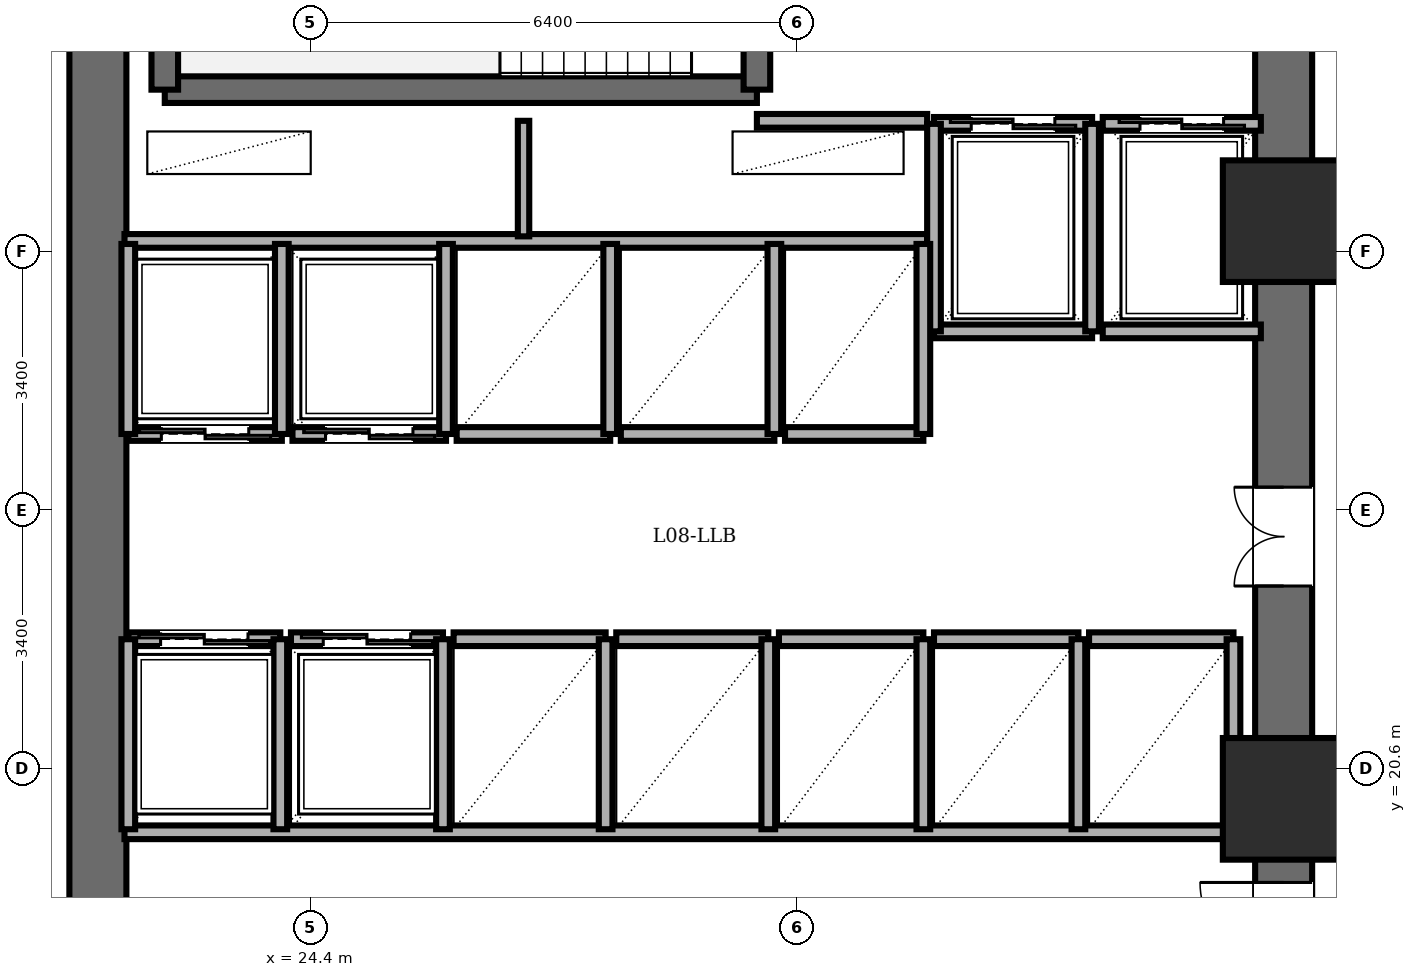
"""IFC4 building model, lengths in metres.
Left out: names, types, materials, properties, quantities, classifications, styles, units other than length and angle.
Written with IfcOpenShell. Run it as: python <this file> out.ifc"""

import sys

from ifc_helpers import new_model, si_unit, direction, frame, frame_2d, origin, origin_2d, place, context, subcontext, project, spatial, rectangle, extrude, element, fill, save


model = new_model("IFC4")
c1 = context("Model", 3, precision=1e-05, world=origin(), true_north=direction((0.0, 1.0)))
c2 = subcontext(c1, "Body", "Model", "MODEL_VIEW")
j1 = project(units=[si_unit("LENGTHUNIT", "METRE"), si_unit("PLANEANGLEUNIT", "RADIAN")], contexts=[c1])
p1 = place(None, origin())
s1 = spatial("IfcSite", under=j1, at=p1, CompositionType="ELEMENT")
p2 = place(p1, origin())
s2 = spatial("IfcBuilding", under=s1, at=p2, CompositionType="ELEMENT")
p3 = place(p2, frame((0.0, 0.0, 32.4)))
s3 = spatial("IfcBuildingStorey", under=s2, at=p3, CompositionType="ELEMENT", Elevation=32.4)
for number, where, z_axis, x_axis in (
    (1, (37.2, 20.2, 0.0), (0.0, 0.0, 1.0), (1.0, 0.0, 0.0)),
    (2, (37.2, 27.8, 0.0), (0.0, 0.0, 1.0), (1.0, 0.0, 0.0)),
):
    element("IfcColumn", number, at=place(p3, frame(where, z_axis=z_axis, x_axis=x_axis)), inside=s3, PredefinedType="COLUMN", context=c2, shape_type="SweptSolid", body=[
        extrude(rectangle(XDim=1.6, YDim=1.6, at=origin_2d()), origin(), (0.0, 0.0, 1.0), 3.6),
    ])
p4 = place(p3, frame((21.6, 14.4, 0.0), z_axis=(0.0, 0.0, 1.0), x_axis=(0.0, 1.0, 0.0)))
e3 = element("IfcWall", 3, at=p4, inside=s3, PredefinedType="SHEAR", context=c2, shape_type="SweptSolid", body=[
    extrude(rectangle(XDim=19.2, YDim=0.75, at=frame_2d((9.6, 0.0))), origin(), (0.0, 0.0, 1.0), 3.4),
])
p5 = place(p3, frame((37.2, 14.4, 0.0), z_axis=(0.0, 0.0, 1.0), x_axis=(0.0, 1.0, 0.0)))
e4 = element("IfcWall", 4, at=p5, inside=s3, PredefinedType="SHEAR", context=c2, shape_type="SweptSolid", body=[
    extrude(rectangle(XDim=19.2, YDim=0.75, at=frame_2d((9.6, 0.0))), origin(), (0.0, 0.0, 1.0), 3.4),
])
p6 = place(p5, frame((15.8, 0.0, 0.0)))
e5 = element("IfcOpeningElement", 5, at=p6, cuts=e4, PredefinedType="OPENING", context=c2, shape_type="SweptSolid", body=[
    extrude(rectangle(XDim=1.15, YDim=2.15, at=frame_2d((0.575, 1.075))), frame((0.0, 0.385, 0.0), z_axis=(0.0, -1.0, 0.0), x_axis=(1.0, 0.0, 0.0)), (0.0, 0.0, 1.0), 0.77),
])
p7 = place(p5, frame((3.6, 0.0, 0.0)))
e6 = element("IfcOpeningElement", 6, at=p7, cuts=e4, PredefinedType="OPENING", context=c2, shape_type="SweptSolid", body=[
    extrude(rectangle(XDim=1.1, YDim=2.15, at=frame_2d((0.55, 1.075))), frame((0.0, 0.385, 0.0), z_axis=(0.0, -1.0, 0.0), x_axis=(1.0, 0.0, 0.0)), (0.0, 0.0, 1.0), 0.77),
])
p8 = place(p5, frame((8.6, 0.0, 0.0)))
e7 = element("IfcOpeningElement", 7, at=p8, cuts=e4, PredefinedType="OPENING", context=c2, shape_type="SweptSolid", body=[
    extrude(rectangle(XDim=1.3, YDim=2.2, at=frame_2d((0.65, 1.1))), frame((0.0, 0.385, 0.0), z_axis=(0.0, -1.0, 0.0), x_axis=(1.0, 0.0, 0.0)), (0.0, 0.0, 1.0), 0.77),
])
p9 = place(p3, frame((22.48, 29.53, 0.0), z_axis=(0.0, 0.0, 1.0), x_axis=(1.0, 0.0, 0.0)))
e8 = element("IfcWall", 8, at=p9, inside=s3, PredefinedType="SOLIDWALL", context=c2, shape_type="SweptSolid", body=[
    extrude(rectangle(XDim=7.79, YDim=0.35, at=frame_2d((3.895, 0.0))), origin(), (0.0, 0.0, 1.0), 3.4),
])
p10 = place(p3, frame((22.48, 29.53, 0.0), z_axis=(0.0, 0.0, 1.0), x_axis=(0.0, 1.0, 0.0)))
e9 = element("IfcWall", 9, at=p10, inside=s3, PredefinedType="SOLIDWALL", context=c2, shape_type="SweptSolid", body=[
    extrude(rectangle(XDim=3.58, YDim=0.35, at=frame_2d((1.79, 0.0))), origin(), (0.0, 0.0, 1.0), 3.4),
])
p11 = place(p3, frame((30.27, 29.53, 0.0), z_axis=(0.0, 0.0, 1.0), x_axis=(0.0, 1.0, 0.0)))
e10 = element("IfcWall", 10, at=p11, inside=s3, PredefinedType="SOLIDWALL", context=c2, shape_type="SweptSolid", body=[
    extrude(rectangle(XDim=3.58, YDim=0.35, at=frame_2d((1.79, 0.0))), origin(), (0.0, 0.0, 1.0), 3.4),
])
p12 = place(p11, frame((1.25, 0.0, 0.0)))
e11 = element("IfcOpeningElement", 11, at=p12, cuts=e10, PredefinedType="OPENING", context=c2, shape_type="SweptSolid", body=[
    extrude(rectangle(XDim=1.1, YDim=2.15, at=frame_2d((0.55, 1.075))), frame((0.0, 0.185, 0.0), z_axis=(0.0, -1.0, 0.0), x_axis=(1.0, 0.0, 0.0)), (0.0, 0.0, 1.0), 0.37),
])
p13 = place(p3, frame((30.27, 29.12, 0.0), z_axis=(0.0, 0.0, 1.0), x_axis=(1.0, 0.0, 0.0)))
e12 = element("IfcWall", 12, at=p13, inside=s3, PredefinedType="PARTITIONING", context=c2, shape_type="SweptSolid", body=[
    extrude(rectangle(XDim=2.24, YDim=0.18, at=frame_2d((1.12, 0.0))), origin(), (0.0, 0.0, 1.0), 3.4),
])
p14 = place(p3, frame((21.95, 27.54, 0.0), z_axis=(0.0, 0.0, 1.0), x_axis=(1.0, 0.0, 0.0)))
e13 = element("IfcWall", 13, at=p14, inside=s3, PredefinedType="PARTITIONING", context=c2, shape_type="SweptSolid", body=[
    extrude(rectangle(XDim=10.56, YDim=0.18, at=frame_2d((5.28, 0.0))), origin(), (0.0, 0.0, 1.0), 3.4),
])
p15 = place(p3, frame((27.2, 27.6, 0.0), z_axis=(0.0, 0.0, 1.0), x_axis=(0.0, 1.0, 0.0)))
e14 = element("IfcWall", 14, at=p15, inside=s3, PredefinedType="PARTITIONING", context=c2, shape_type="SweptSolid", body=[
    extrude(rectangle(XDim=1.52, YDim=0.15, at=frame_2d((0.76, 0.0))), origin(), (0.0, 0.0, 1.0), 3.4),
])
p16 = place(p3, frame((21.95, 19.76, 0.0), z_axis=(0.0, 0.0, 1.0), x_axis=(1.0, 0.0, 0.0)))
e15 = element("IfcWall", 15, at=p16, inside=s3, PredefinedType="PARTITIONING", context=c2, shape_type="SweptSolid", body=[
    extrude(rectangle(XDim=14.87, YDim=0.18, at=frame_2d((7.435, 0.0))), origin(), (0.0, 0.0, 1.0), 3.4),
])
p17 = place(p3, frame((32.6, 29.08, 0.0), z_axis=(0.0, 0.0, 1.0), x_axis=(1.0, 0.0, 0.0)))
e16 = element("IfcWall", 16, at=p17, inside=s3, PredefinedType="PARTITIONING", context=c2, shape_type="SweptSolid", body=[
    extrude(rectangle(XDim=2.08, YDim=0.18, at=frame_2d((1.04, 0.0))), origin(), (0.0, 0.0, 1.0), 3.4),
])
p18 = place(p17, frame((0.49, 0.0, 0.0)))
e17 = element("IfcOpeningElement", 17, at=p18, cuts=e16, PredefinedType="OPENING", context=c2, shape_type="SweptSolid", body=[
    extrude(rectangle(XDim=1.1, YDim=2.2, at=frame_2d((0.55, 1.1))), frame((0.0, 0.1, 0.0), z_axis=(0.0, -1.0, 0.0), x_axis=(1.0, 0.0, 0.0)), (0.0, 0.0, 1.0), 0.2),
])
p19 = place(p3, frame((34.68, 26.35, 0.0), z_axis=(0.0, 0.0, 1.0), x_axis=(-1.0, 0.0, 0.0)))
e18 = element("IfcWall", 18, at=p19, inside=s3, PredefinedType="PARTITIONING", context=c2, shape_type="SweptSolid", body=[
    extrude(rectangle(XDim=2.08, YDim=0.18, at=frame_2d((1.04, 0.0))), origin(), (0.0, 0.0, 1.0), 3.4),
])
for number, where, z_axis, x_axis in (
    (19, (34.68, 26.35, 0.0), (0.0, 0.0, 1.0), (0.0, 1.0, 0.0)),
    (20, (32.6, 29.08, 0.0), (0.0, 0.0, 1.0), (0.0, -1.0, 0.0)),
):
    element("IfcWall", number, at=place(p3, frame(where, z_axis=z_axis, x_axis=x_axis)), inside=s3, PredefinedType="PARTITIONING", context=c2, shape_type="SweptSolid", body=[
        extrude(rectangle(XDim=2.73, YDim=0.18, at=frame_2d((1.365, 0.0))), origin(), (0.0, 0.0, 1.0), 3.4),
    ])
p20 = place(p3, frame((34.82, 29.08, 0.0), z_axis=(0.0, 0.0, 1.0), x_axis=(1.0, 0.0, 0.0)))
e21 = element("IfcWall", 21, at=p20, inside=s3, PredefinedType="PARTITIONING", context=c2, shape_type="SweptSolid", body=[
    extrude(rectangle(XDim=2.08, YDim=0.18, at=frame_2d((1.04, 0.0))), origin(), (0.0, 0.0, 1.0), 3.4),
])
p21 = place(p20, frame((0.49, 0.0, 0.0)))
e22 = element("IfcOpeningElement", 22, at=p21, cuts=e21, PredefinedType="OPENING", context=c2, shape_type="SweptSolid", body=[
    extrude(rectangle(XDim=1.1, YDim=2.2, at=frame_2d((0.55, 1.1))), frame((0.0, 0.1, 0.0), z_axis=(0.0, -1.0, 0.0), x_axis=(1.0, 0.0, 0.0)), (0.0, 0.0, 1.0), 0.2),
])
p22 = place(p3, frame((36.9, 26.35, 0.0), z_axis=(0.0, 0.0, 1.0), x_axis=(-1.0, 0.0, 0.0)))
e23 = element("IfcWall", 23, at=p22, inside=s3, PredefinedType="PARTITIONING", context=c2, shape_type="SweptSolid", body=[
    extrude(rectangle(XDim=2.08, YDim=0.18, at=frame_2d((1.04, 0.0))), origin(), (0.0, 0.0, 1.0), 3.4),
])
p23 = place(p3, frame((24.02, 25.0, 0.0), z_axis=(0.0, 0.0, 1.0), x_axis=(-1.0, 0.0, 0.0)))
e24 = element("IfcWall", 24, at=p23, inside=s3, PredefinedType="PARTITIONING", context=c2, shape_type="SweptSolid", body=[
    extrude(rectangle(XDim=2.02, YDim=0.18, at=frame_2d((1.01, 0.0))), origin(), (0.0, 0.0, 1.0), 3.4),
])
p24 = place(p23, frame((0.435, 0.0, 0.0)))
e25 = element("IfcOpeningElement", 25, at=p24, cuts=e24, PredefinedType="OPENING", context=c2, shape_type="SweptSolid", body=[
    extrude(rectangle(XDim=1.15, YDim=2.2, at=frame_2d((0.575, 1.1))), frame((0.0, 0.1, 0.0), z_axis=(0.0, -1.0, 0.0), x_axis=(1.0, 0.0, 0.0)), (0.0, 0.0, 1.0), 0.2),
])
for number, where, z_axis, x_axis in (
    (26, (24.02, 25.0, 0.0), (0.0, 0.0, 1.0), (0.0, 1.0, 0.0)),
    (27, (22.0, 27.5, 0.0), (0.0, 0.0, 1.0), (0.0, -1.0, 0.0)),
):
    element("IfcWall", number, at=place(p3, frame(where, z_axis=z_axis, x_axis=x_axis)), inside=s3, PredefinedType="PARTITIONING", context=c2, shape_type="SweptSolid", body=[
        extrude(rectangle(XDim=2.5, YDim=0.18, at=frame_2d((1.25, 0.0))), origin(), (0.0, 0.0, 1.0), 3.4),
    ])
p25 = place(p3, frame((26.18, 25.0, 0.0), z_axis=(0.0, 0.0, 1.0), x_axis=(-1.0, 0.0, 0.0)))
e28 = element("IfcWall", 28, at=p25, inside=s3, PredefinedType="PARTITIONING", context=c2, shape_type="SweptSolid", body=[
    extrude(rectangle(XDim=2.02, YDim=0.18, at=frame_2d((1.01, 0.0))), origin(), (0.0, 0.0, 1.0), 3.4),
])
p26 = place(p25, frame((0.435, 0.0, 0.0)))
e29 = element("IfcOpeningElement", 29, at=p26, cuts=e28, PredefinedType="OPENING", context=c2, shape_type="SweptSolid", body=[
    extrude(rectangle(XDim=1.15, YDim=2.2, at=frame_2d((0.575, 1.1))), frame((0.0, 0.1, 0.0), z_axis=(0.0, -1.0, 0.0), x_axis=(1.0, 0.0, 0.0)), (0.0, 0.0, 1.0), 0.2),
])
p27 = place(p3, frame((26.18, 25.0, 0.0), z_axis=(0.0, 0.0, 1.0), x_axis=(0.0, 1.0, 0.0)))
e30 = element("IfcWall", 30, at=p27, inside=s3, PredefinedType="PARTITIONING", context=c2, shape_type="SweptSolid", body=[
    extrude(rectangle(XDim=2.5, YDim=0.18, at=frame_2d((1.25, 0.0))), origin(), (0.0, 0.0, 1.0), 3.4),
])
p28 = place(p3, frame((22.0, 22.3, 0.0), z_axis=(0.0, 0.0, 1.0), x_axis=(1.0, 0.0, 0.0)))
e31 = element("IfcWall", 31, at=p28, inside=s3, PredefinedType="PARTITIONING", context=c2, shape_type="SweptSolid", body=[
    extrude(rectangle(XDim=2.0, YDim=0.18, at=frame_2d((1.0, 0.0))), origin(), (0.0, 0.0, 1.0), 3.4),
])
p29 = place(p28, frame((0.425, 0.0, 0.0)))
e32 = element("IfcOpeningElement", 32, at=p29, cuts=e31, PredefinedType="OPENING", context=c2, shape_type="SweptSolid", body=[
    extrude(rectangle(XDim=1.15, YDim=2.2, at=frame_2d((0.575, 1.1))), frame((0.0, 0.1, 0.0), z_axis=(0.0, -1.0, 0.0), x_axis=(1.0, 0.0, 0.0)), (0.0, 0.0, 1.0), 0.2),
])
for number, where, z_axis, x_axis in (
    (33, (24.0, 19.8, 0.0), (0.0, 0.0, 1.0), (0.0, 1.0, 0.0)),
    (34, (22.0, 22.3, 0.0), (0.0, 0.0, 1.0), (0.0, -1.0, 0.0)),
):
    element("IfcWall", number, at=place(p3, frame(where, z_axis=z_axis, x_axis=x_axis)), inside=s3, PredefinedType="PARTITIONING", context=c2, shape_type="SweptSolid", body=[
        extrude(rectangle(XDim=2.5, YDim=0.18, at=frame_2d((1.25, 0.0))), origin(), (0.0, 0.0, 1.0), 3.4),
    ])
p30 = place(p3, frame((24.14, 22.3, 0.0), z_axis=(0.0, 0.0, 1.0), x_axis=(1.0, 0.0, 0.0)))
e35 = element("IfcWall", 35, at=p30, inside=s3, PredefinedType="PARTITIONING", context=c2, shape_type="SweptSolid", body=[
    extrude(rectangle(XDim=2.0, YDim=0.18, at=frame_2d((1.0, 0.0))), origin(), (0.0, 0.0, 1.0), 3.4),
])
p31 = place(p30, frame((0.425, 0.0, 0.0)))
e36 = element("IfcOpeningElement", 36, at=p31, cuts=e35, PredefinedType="OPENING", context=c2, shape_type="SweptSolid", body=[
    extrude(rectangle(XDim=1.15, YDim=2.2, at=frame_2d((0.575, 1.1))), frame((0.0, 0.1, 0.0), z_axis=(0.0, -1.0, 0.0), x_axis=(1.0, 0.0, 0.0)), (0.0, 0.0, 1.0), 0.2),
])
p32 = place(p3, frame((26.14, 19.8, 0.0), z_axis=(0.0, 0.0, 1.0), x_axis=(0.0, 1.0, 0.0)))
e37 = element("IfcWall", 37, at=p32, inside=s3, PredefinedType="PARTITIONING", context=c2, shape_type="SweptSolid", body=[
    extrude(rectangle(XDim=2.5, YDim=0.18, at=frame_2d((1.25, 0.0))), origin(), (0.0, 0.0, 1.0), 3.4),
])
p33 = place(p3, frame((28.34, 25.0, 0.0), z_axis=(0.0, 0.0, 1.0), x_axis=(-1.0, 0.0, 0.0)))
e38 = element("IfcWall", 38, at=p33, inside=s3, PredefinedType="PARTITIONING", context=c2, shape_type="SweptSolid", body=[
    extrude(rectangle(XDim=2.02, YDim=0.18, at=frame_2d((1.01, 0.0))), origin(), (0.0, 0.0, 1.0), 3.4),
])
p34 = place(p3, frame((28.34, 25.0, 0.0), z_axis=(0.0, 0.0, 1.0), x_axis=(0.0, 1.0, 0.0)))
e39 = element("IfcWall", 39, at=p34, inside=s3, PredefinedType="PARTITIONING", context=c2, shape_type="SweptSolid", body=[
    extrude(rectangle(XDim=2.5, YDim=0.18, at=frame_2d((1.25, 0.0))), origin(), (0.0, 0.0, 1.0), 3.4),
])
p35 = place(p3, frame((30.5, 25.0, 0.0), z_axis=(0.0, 0.0, 1.0), x_axis=(-1.0, 0.0, 0.0)))
e40 = element("IfcWall", 40, at=p35, inside=s3, PredefinedType="PARTITIONING", context=c2, shape_type="SweptSolid", body=[
    extrude(rectangle(XDim=2.02, YDim=0.18, at=frame_2d((1.01, 0.0))), origin(), (0.0, 0.0, 1.0), 3.4),
])
p36 = place(p3, frame((30.5, 25.0, 0.0), z_axis=(0.0, 0.0, 1.0), x_axis=(0.0, 1.0, 0.0)))
e41 = element("IfcWall", 41, at=p36, inside=s3, PredefinedType="PARTITIONING", context=c2, shape_type="SweptSolid", body=[
    extrude(rectangle(XDim=2.5, YDim=0.18, at=frame_2d((1.25, 0.0))), origin(), (0.0, 0.0, 1.0), 3.4),
])
p37 = place(p3, frame((26.28, 22.3, 0.0), z_axis=(0.0, 0.0, 1.0), x_axis=(1.0, 0.0, 0.0)))
e42 = element("IfcWall", 42, at=p37, inside=s3, PredefinedType="PARTITIONING", context=c2, shape_type="SweptSolid", body=[
    extrude(rectangle(XDim=2.0, YDim=0.18, at=frame_2d((1.0, 0.0))), origin(), (0.0, 0.0, 1.0), 3.4),
])
p38 = place(p3, frame((28.28, 19.8, 0.0), z_axis=(0.0, 0.0, 1.0), x_axis=(0.0, 1.0, 0.0)))
e43 = element("IfcWall", 43, at=p38, inside=s3, PredefinedType="PARTITIONING", context=c2, shape_type="SweptSolid", body=[
    extrude(rectangle(XDim=2.5, YDim=0.18, at=frame_2d((1.25, 0.0))), origin(), (0.0, 0.0, 1.0), 3.4),
])
p39 = place(p3, frame((28.42, 22.3, 0.0), z_axis=(0.0, 0.0, 1.0), x_axis=(1.0, 0.0, 0.0)))
e44 = element("IfcWall", 44, at=p39, inside=s3, PredefinedType="PARTITIONING", context=c2, shape_type="SweptSolid", body=[
    extrude(rectangle(XDim=2.0, YDim=0.18, at=frame_2d((1.0, 0.0))), origin(), (0.0, 0.0, 1.0), 3.4),
])
p40 = place(p3, frame((30.42, 19.8, 0.0), z_axis=(0.0, 0.0, 1.0), x_axis=(0.0, 1.0, 0.0)))
e45 = element("IfcWall", 45, at=p40, inside=s3, PredefinedType="PARTITIONING", context=c2, shape_type="SweptSolid", body=[
    extrude(rectangle(XDim=2.5, YDim=0.18, at=frame_2d((1.25, 0.0))), origin(), (0.0, 0.0, 1.0), 3.4),
])
p41 = place(p3, frame((32.46, 25.0, 0.0), z_axis=(0.0, 0.0, 1.0), x_axis=(-1.0, 0.0, 0.0)))
e46 = element("IfcWall", 46, at=p41, inside=s3, PredefinedType="PARTITIONING", context=c2, shape_type="SweptSolid", body=[
    extrude(rectangle(XDim=1.82, YDim=0.18, at=frame_2d((0.91, 0.0))), origin(), (0.0, 0.0, 1.0), 3.4),
])
p42 = place(p3, frame((32.46, 25.0, 0.0), z_axis=(0.0, 0.0, 1.0), x_axis=(0.0, 1.0, 0.0)))
e47 = element("IfcWall", 47, at=p42, inside=s3, PredefinedType="PARTITIONING", context=c2, shape_type="SweptSolid", body=[
    extrude(rectangle(XDim=2.5, YDim=0.18, at=frame_2d((1.25, 0.0))), origin(), (0.0, 0.0, 1.0), 3.4),
])
p43 = place(p3, frame((30.56, 22.3, 0.0), z_axis=(0.0, 0.0, 1.0), x_axis=(1.0, 0.0, 0.0)))
e48 = element("IfcWall", 48, at=p43, inside=s3, PredefinedType="PARTITIONING", context=c2, shape_type="SweptSolid", body=[
    extrude(rectangle(XDim=1.9, YDim=0.18, at=frame_2d((0.95, 0.0))), origin(), (0.0, 0.0, 1.0), 3.4),
])
p44 = place(p3, frame((32.46, 19.8, 0.0), z_axis=(0.0, 0.0, 1.0), x_axis=(0.0, 1.0, 0.0)))
e49 = element("IfcWall", 49, at=p44, inside=s3, PredefinedType="PARTITIONING", context=c2, shape_type="SweptSolid", body=[
    extrude(rectangle(XDim=2.5, YDim=0.18, at=frame_2d((1.25, 0.0))), origin(), (0.0, 0.0, 1.0), 3.4),
])
p45 = place(p3, frame((32.6, 22.3, 0.0), z_axis=(0.0, 0.0, 1.0), x_axis=(1.0, 0.0, 0.0)))
e50 = element("IfcWall", 50, at=p45, inside=s3, PredefinedType="PARTITIONING", context=c2, shape_type="SweptSolid", body=[
    extrude(rectangle(XDim=1.9, YDim=0.18, at=frame_2d((0.95, 0.0))), origin(), (0.0, 0.0, 1.0), 3.4),
])
p46 = place(p3, frame((34.5, 19.8, 0.0), z_axis=(0.0, 0.0, 1.0), x_axis=(0.0, 1.0, 0.0)))
e51 = element("IfcWall", 51, at=p46, inside=s3, PredefinedType="PARTITIONING", context=c2, shape_type="SweptSolid", body=[
    extrude(rectangle(XDim=2.5, YDim=0.18, at=frame_2d((1.25, 0.0))), origin(), (0.0, 0.0, 1.0), 3.4),
])
p47 = place(p3, frame((34.64, 22.3, 0.0), z_axis=(0.0, 0.0, 1.0), x_axis=(1.0, 0.0, 0.0)))
e52 = element("IfcWall", 52, at=p47, inside=s3, PredefinedType="PARTITIONING", context=c2, shape_type="SweptSolid", body=[
    extrude(rectangle(XDim=1.9, YDim=0.18, at=frame_2d((0.95, 0.0))), origin(), (0.0, 0.0, 1.0), 3.4),
])
p48 = place(p3, frame((36.54, 19.8, 0.0), z_axis=(0.0, 0.0, 1.0), x_axis=(0.0, 1.0, 0.0)))
e53 = element("IfcWall", 53, at=p48, inside=s3, PredefinedType="PARTITIONING", context=c2, shape_type="SweptSolid", body=[
    extrude(rectangle(XDim=2.5, YDim=0.18, at=frame_2d((1.25, 0.0))), origin(), (0.0, 0.0, 1.0), 3.4),
])
p49 = place(p7, origin())
e54 = element("IfcDoor", 54, at=p49, inside=s3, OperationType="SINGLE_SWING_RIGHT", PredefinedType="DOOR", context=c2, shape_type="SweptSolid", body=[
    extrude(rectangle(XDim=1.1, YDim=2.15, at=frame_2d((0.55, 1.075))), frame((0.0, 0.025, 0.0), z_axis=(0.0, -1.0, 0.0), x_axis=(1.0, 0.0, 0.0)), (0.0, 0.0, 1.0), 0.05),
])
fill(e6, e54)
p50 = place(p18, origin())
e55 = element("IfcDoor", 55, at=p50, inside=s3, OperationType="DOUBLE_DOOR_SLIDING", PredefinedType="DOOR", context=c2, shape_type="SweptSolid", body=[
    extrude(rectangle(XDim=1.1, YDim=2.2, at=frame_2d((0.55, 1.1))), frame((0.0, 0.025, 0.0), z_axis=(0.0, -1.0, 0.0), x_axis=(1.0, 0.0, 0.0)), (0.0, 0.0, 1.0), 0.05),
])
fill(e17, e55)
p51 = place(p21, origin())
e56 = element("IfcDoor", 56, at=p51, inside=s3, OperationType="DOUBLE_DOOR_SLIDING", PredefinedType="DOOR", context=c2, shape_type="SweptSolid", body=[
    extrude(rectangle(XDim=1.1, YDim=2.2, at=frame_2d((0.55, 1.1))), frame((0.0, 0.025, 0.0), z_axis=(0.0, -1.0, 0.0), x_axis=(1.0, 0.0, 0.0)), (0.0, 0.0, 1.0), 0.05),
])
fill(e22, e56)
p52 = place(p24, origin())
e57 = element("IfcDoor", 57, at=p52, inside=s3, OperationType="DOUBLE_DOOR_SLIDING", PredefinedType="DOOR", context=c2, shape_type="SweptSolid", body=[
    extrude(rectangle(XDim=1.15, YDim=2.2, at=frame_2d((0.575, 1.1))), frame((0.0, 0.025, 0.0), z_axis=(0.0, -1.0, 0.0), x_axis=(1.0, 0.0, 0.0)), (0.0, 0.0, 1.0), 0.05),
])
fill(e25, e57)
p53 = place(p26, origin())
e58 = element("IfcDoor", 58, at=p53, inside=s3, OperationType="DOUBLE_DOOR_SLIDING", PredefinedType="DOOR", context=c2, shape_type="SweptSolid", body=[
    extrude(rectangle(XDim=1.15, YDim=2.2, at=frame_2d((0.575, 1.1))), frame((0.0, 0.025, 0.0), z_axis=(0.0, -1.0, 0.0), x_axis=(1.0, 0.0, 0.0)), (0.0, 0.0, 1.0), 0.05),
])
fill(e29, e58)
p54 = place(p29, origin())
e59 = element("IfcDoor", 59, at=p54, inside=s3, OperationType="DOUBLE_DOOR_SLIDING", PredefinedType="DOOR", context=c2, shape_type="SweptSolid", body=[
    extrude(rectangle(XDim=1.15, YDim=2.2, at=frame_2d((0.575, 1.1))), frame((0.0, 0.025, 0.0), z_axis=(0.0, -1.0, 0.0), x_axis=(1.0, 0.0, 0.0)), (0.0, 0.0, 1.0), 0.05),
])
fill(e32, e59)
p55 = place(p31, origin())
e60 = element("IfcDoor", 60, at=p55, inside=s3, OperationType="DOUBLE_DOOR_SLIDING", PredefinedType="DOOR", context=c2, shape_type="SweptSolid", body=[
    extrude(rectangle(XDim=1.15, YDim=2.2, at=frame_2d((0.575, 1.1))), frame((0.0, 0.025, 0.0), z_axis=(0.0, -1.0, 0.0), x_axis=(1.0, 0.0, 0.0)), (0.0, 0.0, 1.0), 0.05),
])
fill(e36, e60)
p56 = place(p8, origin())
e61 = element("IfcDoor", 61, at=p56, inside=s3, OperationType="DOUBLE_DOOR_SINGLE_SWING", PredefinedType="DOOR", context=c2, shape_type="SweptSolid", body=[
    extrude(rectangle(XDim=1.3, YDim=2.2, at=frame_2d((0.65, 1.1))), frame((0.0, 0.025, 0.0), z_axis=(0.0, -1.0, 0.0), x_axis=(1.0, 0.0, 0.0)), (0.0, 0.0, 1.0), 0.05),
])
fill(e7, e61)
save(model, sys.argv[1])
